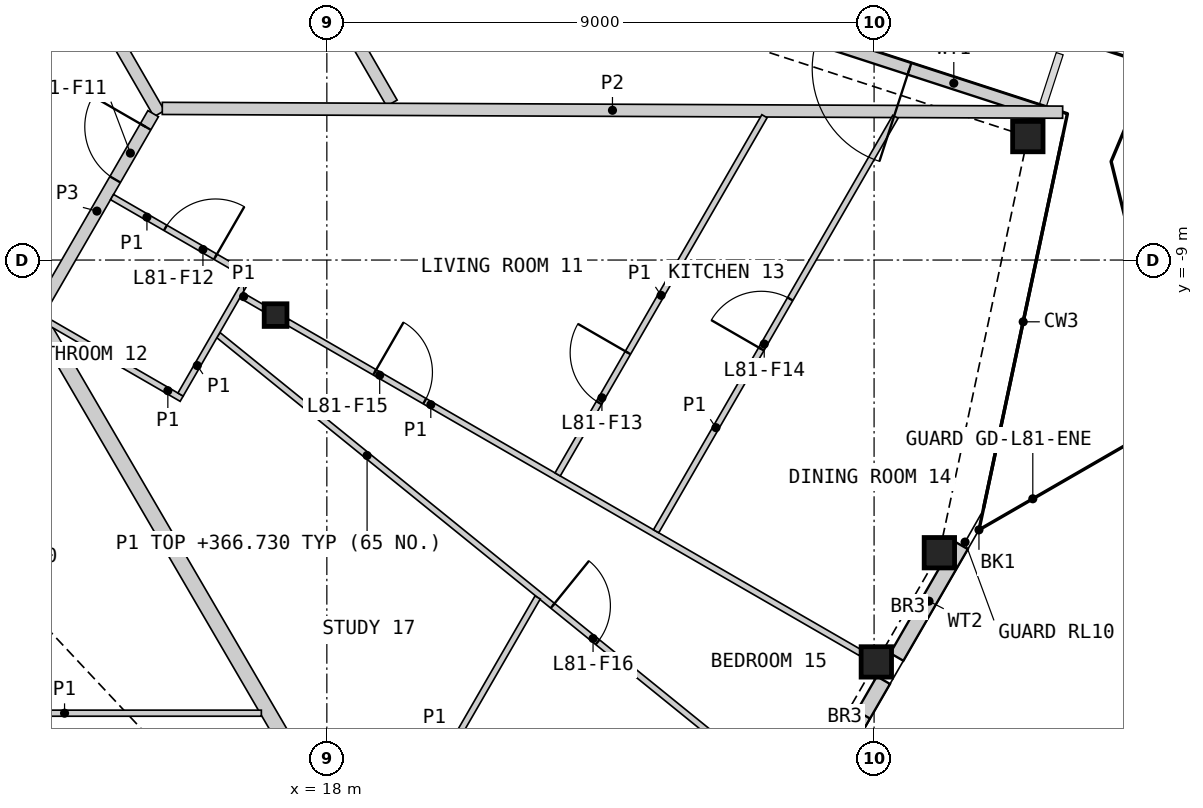
"""IFC4 building model, lengths in metres.
Left out: names, types, materials, properties, quantities, classifications, styles, units other than length and angle.
Written with IfcOpenShell. Run it as: python <this file> out.ifc"""

import sys

from ifc_helpers import new_model, si_unit, direction, frame, frame_2d, origin, origin_2d, place, context, subcontext, project, spatial, rectangle, hollow_rectangle, i_section, extrude, element, fill, save


model = new_model("IFC4")
c1 = context("Model", 3, precision=1e-05, world=origin(), true_north=direction((0.0, 1.0)))
c2 = subcontext(c1, "Body", "Model", "MODEL_VIEW")
j1 = project(units=[si_unit("LENGTHUNIT", "METRE"), si_unit("PLANEANGLEUNIT", "RADIAN")], contexts=[c1])
p1 = place(None, origin())
s1 = spatial("IfcSite", under=j1, at=p1, CompositionType="ELEMENT")
p2 = place(p1, origin())
s2 = spatial("IfcBuilding", under=s1, at=p2, CompositionType="ELEMENT")
p3 = place(p2, frame((0.0, 0.0, 364.4)))
s3 = spatial("IfcBuildingStorey", under=s2, at=p3, CompositionType="ELEMENT", Elevation=364.4)
for number, where, z_axis, x_axis in (
    (1, (27.037, -15.61, 0.0), (0.0, 0.0, 1.0), (1.0, 0.0, 0.0)),
    (2, (28.074, -13.814, 0.0), (0.0, 0.0, 1.0), (1.0, 0.0, 0.0)),
    (3, (29.529, -6.969, 0.0), (0.0, 0.0, 1.0), (1.0, 0.0, 0.0)),
):
    element("IfcColumn", number, at=place(p3, frame(where, z_axis=z_axis, x_axis=x_axis)), inside=s3, PredefinedType="COLUMN", context=c2, shape_type="SweptSolid", body=[
        extrude(hollow_rectangle(XDim=0.5, YDim=0.5, WallThickness=0.03, at=origin_2d()), origin(), (0.0, 0.0, 1.0), 3.4),
    ])
p4 = place(p3, frame((17.157, -9.906, 0.0), z_axis=(0.0, 0.0, 1.0), x_axis=(1.0, 0.0, 0.0)))
e4 = element("IfcColumn", 4, at=p4, inside=s3, PredefinedType="COLUMN", context=c2, shape_type="SweptSolid", body=[
    extrude(i_section(OverallWidth=0.374, OverallDepth=0.372, WebThickness=0.016, FlangeThickness=0.026, at=origin_2d()), origin(), (0.0, 0.0, 1.0), 3.4),
])
p5 = place(p3, frame((25.935, -18.02, 0.0), z_axis=(0.0, 0.0, 1.0), x_axis=(0.500028873844, 0.866008732821, 0.0)))
e5 = element("IfcWall", 5, at=p5, inside=s3, PredefinedType="SOLIDWALL", context=c2, shape_type="SweptSolid", body=[
    extrude(rectangle(XDim=2.437, YDim=0.25, at=frame_2d((1.218, 0.0))), origin(), (0.0, 0.0, 1.0), 2.634),
])
p6 = place(p5, frame((0.88, 0.0, 0.6)))
e6 = element("IfcOpeningElement", 6, at=p6, cuts=e5, PredefinedType="OPENING", context=c2, shape_type="SweptSolid", body=[
    extrude(rectangle(XDim=0.9, YDim=1.8, at=frame_2d((0.45, 0.9))), frame((0.0, 0.135, 0.0), z_axis=(0.0, -1.0, 0.0), x_axis=(1.0, 0.0, 0.0)), (0.0, 0.0, 1.0), 0.27),
])
p7 = place(p3, frame((27.374, -15.528, 0.0), z_axis=(0.0, 0.0, 1.0), x_axis=(0.499941779639, 0.866059014716, 0.0)))
e7 = element("IfcWall", 7, at=p7, inside=s3, PredefinedType="SOLIDWALL", context=c2, shape_type="SweptSolid", body=[
    extrude(rectangle(XDim=2.12, YDim=0.25, at=frame_2d((1.06, 0.0))), origin(), (0.0, 0.0, 1.0), 2.634),
])
p8 = place(p3, frame((29.801, -6.576, 0.0), z_axis=(0.0, 0.0, 1.0), x_axis=(-0.951060123915, 0.309005891041, 0.0)))
e8 = element("IfcWall", 8, at=p8, inside=s3, PredefinedType="SOLIDWALL", context=c2, shape_type="SweptSolid", body=[
    extrude(rectangle(XDim=6.265, YDim=0.2, at=frame_2d((3.133, 0.0))), origin(), (0.0, 0.0, 1.0), 2.634),
])
p9 = place(p8, frame((2.333, 0.0, 0.0)))
e9 = element("IfcOpeningElement", 9, at=p9, cuts=e8, PredefinedType="OPENING", context=c2, shape_type="SweptSolid", body=[
    extrude(rectangle(XDim=1.6, YDim=2.25, at=frame_2d((0.8, 1.125))), frame((0.0, 0.11, 0.0), z_axis=(0.0, -1.0, 0.0), x_axis=(1.0, 0.0, 0.0)), (0.0, 0.0, 1.0), 0.22),
])
p10 = place(p3, frame((13.168, -9.798, 0.0), z_axis=(0.0, 0.0, 1.0), x_axis=(0.503632750219, -0.863917850786, 0.0)))
e10 = element("IfcWall", 10, at=p10, inside=s3, PredefinedType="PARTITIONING", context=c2, shape_type="SweptSolid", body=[
    extrude(rectangle(XDim=14.972, YDim=0.25, at=frame_2d((7.486, 0.0))), origin(), (0.0, 0.0, 1.0), 2.33),
])
p11 = place(p3, frame((12.981, -2.673, 0.0), z_axis=(0.0, 0.0, 1.0), x_axis=(0.499974648164, -0.866040040179, 0.0)))
e11 = element("IfcWall", 11, at=p11, inside=s3, PredefinedType="PARTITIONING", context=c2, shape_type="SweptSolid", body=[
    extrude(rectangle(XDim=4.525, YDim=0.2, at=frame_2d((2.263, 0.0))), origin(), (0.0, 0.0, 1.0), 3.1),
])
p12 = place(p3, frame((13.293, -9.797, 0.0), z_axis=(0.0, 0.0, 1.0), x_axis=(0.499977520935, 0.86603838169, 0.0)))
e12 = element("IfcWall", 12, at=p12, inside=s3, PredefinedType="PARTITIONING", context=c2, shape_type="SweptSolid", body=[
    extrude(rectangle(XDim=3.701, YDim=0.2, at=frame_2d((1.851, 0.0))), origin(), (0.0, 0.0, 1.0), 3.1),
])
p13 = place(p12, frame((2.451, 0.0, 0.0)))
e13 = element("IfcOpeningElement", 13, at=p13, cuts=e12, PredefinedType="OPENING", context=c2, shape_type="SweptSolid", body=[
    extrude(rectangle(XDim=1.0, YDim=2.1, at=frame_2d((0.5, 1.05))), frame((0.0, 0.11, 0.0), z_axis=(0.0, -1.0, 0.0), x_axis=(1.0, 0.0, 0.0)), (0.0, 0.0, 1.0), 0.22),
])
p14 = place(p3, frame((11.573, 6.566, 0.0), z_axis=(0.0, 0.0, 1.0), x_axis=(0.499993542657, -0.866029131901, 0.0)))
e14 = element("IfcWall", 14, at=p14, inside=s3, PredefinedType="PARTITIONING", context=c2, shape_type="SweptSolid", body=[
    extrude(rectangle(XDim=14.994, YDim=0.2, at=frame_2d((7.497, 0.0))), origin(), (0.0, 0.0, 1.0), 2.33),
])
p15 = place(p14, frame((5.166, 0.0, 0.0)))
e15 = element("IfcOpeningElement", 15, at=p15, cuts=e14, PredefinedType="OPENING", context=c2, shape_type="SweptSolid", body=[
    extrude(rectangle(XDim=0.95, YDim=2.1, at=frame_2d((0.475, 1.05))), frame((0.0, 0.11, 0.0), z_axis=(0.0, -1.0, 0.0), x_axis=(1.0, 0.0, 0.0)), (0.0, 0.0, 1.0), 0.22),
])
p16 = place(p3, frame((15.294, -6.506, 0.0), z_axis=(0.0, 0.0, 1.0), x_axis=(0.99999116141, -0.004204414611, 0.0)))
e16 = element("IfcWall", 16, at=p16, inside=s3, PredefinedType="PARTITIONING", context=c2, shape_type="SweptSolid", body=[
    extrude(rectangle(XDim=14.807, YDim=0.2, at=frame_2d((7.404, 0.0))), origin(), (0.0, 0.0, 1.0), 2.33),
])
p17 = place(p3, frame((16.216, -10.234, 0.0), z_axis=(0.0, 0.0, 1.0), x_axis=(0.777145059662, -0.629321504672, 0.0)))
e17 = element("IfcWall", 17, at=p17, inside=s3, PredefinedType="PARTITIONING", context=c2, shape_type="SweptSolid", body=[
    extrude(rectangle(XDim=12.59, YDim=0.1, at=frame_2d((6.295, 0.0))), origin(), (0.0, 0.0, 1.0), 2.33),
])
p18 = place(p17, frame((7.074, 0.0, 0.0)))
e18 = element("IfcOpeningElement", 18, at=p18, cuts=e17, PredefinedType="OPENING", context=c2, shape_type="SweptSolid", body=[
    extrude(rectangle(XDim=0.95, YDim=2.1, at=frame_2d((0.475, 1.05))), frame((0.0, 0.06, 0.0), z_axis=(0.0, -1.0, 0.0), x_axis=(1.0, 0.0, 0.0)), (0.0, 0.0, 1.0), 0.12),
])
p19 = place(p3, frame((17.354, -10.019, 0.0), z_axis=(0.0, 0.0, 1.0), x_axis=(0.866019680922, -0.500009912158, 0.0)))
e19 = element("IfcWall", 19, at=p19, inside=s3, PredefinedType="PARTITIONING", context=c2, shape_type="SweptSolid", body=[
    extrude(rectangle(XDim=10.881, YDim=0.1, at=frame_2d((5.44, 0.0))), origin(), (0.0, 0.0, 1.0), 2.33),
])
p20 = place(p19, frame((1.655, 0.0, 0.0)))
e20 = element("IfcOpeningElement", 20, at=p20, cuts=e19, PredefinedType="OPENING", context=c2, shape_type="SweptSolid", body=[
    extrude(rectangle(XDim=0.95, YDim=2.1, at=frame_2d((0.475, 1.05))), frame((0.0, 0.06, 0.0), z_axis=(0.0, -1.0, 0.0), x_axis=(1.0, 0.0, 0.0)), (0.0, 0.0, 1.0), 0.12),
])
p21 = place(p3, frame((23.415, -13.461, 0.0), z_axis=(0.0, 0.0, 1.0), x_axis=(0.500011483804, 0.866018773506, 0.0)))
e21 = element("IfcWall", 21, at=p21, inside=s3, PredefinedType="PARTITIONING", context=c2, shape_type="SweptSolid", body=[
    extrude(rectangle(XDim=7.872, YDim=0.1, at=frame_2d((3.936, 0.0))), origin(), (0.0, 0.0, 1.0), 2.33),
])
p22 = place(p21, frame((3.461, 0.0, 0.0)))
e22 = element("IfcOpeningElement", 22, at=p22, cuts=e21, PredefinedType="OPENING", context=c2, shape_type="SweptSolid", body=[
    extrude(rectangle(XDim=0.95, YDim=2.1, at=frame_2d((0.475, 1.05))), frame((0.0, 0.06, 0.0), z_axis=(0.0, -1.0, 0.0), x_axis=(1.0, 0.0, 0.0)), (0.0, 0.0, 1.0), 0.12),
])
p23 = place(p3, frame((21.796, -12.526, 0.0), z_axis=(0.0, 0.0, 1.0), x_axis=(0.499994777381, 0.866028419044, 0.0)))
e23 = element("IfcWall", 23, at=p23, inside=s3, PredefinedType="PARTITIONING", context=c2, shape_type="SweptSolid", body=[
    extrude(rectangle(XDim=6.803, YDim=0.1, at=frame_2d((3.402, 0.0))), origin(), (0.0, 0.0, 1.0), 2.33),
])
p24 = place(p23, frame((1.361, 0.0, 0.0)))
e24 = element("IfcOpeningElement", 24, at=p24, cuts=e23, PredefinedType="OPENING", context=c2, shape_type="SweptSolid", body=[
    extrude(rectangle(XDim=0.95, YDim=2.1, at=frame_2d((0.475, 1.05))), frame((0.0, 0.06, 0.0), z_axis=(0.0, -1.0, 0.0), x_axis=(1.0, 0.0, 0.0)), (0.0, 0.0, 1.0), 0.12),
])
p25 = place(p3, frame((10.45, -16.453, 0.0), z_axis=(0.0, 0.0, 1.0), x_axis=(1.0, 0.0, 0.0)))
e25 = element("IfcWall", 25, at=p25, inside=s3, PredefinedType="PARTITIONING", context=c2, shape_type="SweptSolid", body=[
    extrude(rectangle(XDim=6.473, YDim=0.1, at=frame_2d((3.236, 0.0))), origin(), (0.0, 0.0, 1.0), 2.33),
])
p26 = place(p25, frame((0.853, 0.0, 0.0)))
e26 = element("IfcOpeningElement", 26, at=p26, cuts=e25, PredefinedType="OPENING", context=c2, shape_type="SweptSolid", body=[
    extrude(rectangle(XDim=0.95, YDim=2.1, at=frame_2d((0.475, 1.05))), frame((0.0, 0.06, 0.0), z_axis=(0.0, -1.0, 0.0), x_axis=(1.0, 0.0, 0.0)), (0.0, 0.0, 1.0), 0.12),
])
p27 = place(p3, frame((18.778, -19.206, 0.0), z_axis=(0.0, 0.0, 1.0), x_axis=(0.499992359988, 0.866029814703, 0.0)))
e27 = element("IfcWall", 27, at=p27, inside=s3, PredefinedType="PARTITIONING", context=c2, shape_type="SweptSolid", body=[
    extrude(rectangle(XDim=5.376, YDim=0.1, at=frame_2d((2.688, 0.0))), origin(), (0.0, 0.0, 1.0), 2.33),
])
p28 = place(p27, frame((1.659, 0.0, 0.0)))
e28 = element("IfcOpeningElement", 28, at=p28, cuts=e27, PredefinedType="OPENING", context=c2, shape_type="SweptSolid", body=[
    extrude(rectangle(XDim=0.95, YDim=2.1, at=frame_2d((0.475, 1.05))), frame((0.0, 0.06, 0.0), z_axis=(0.0, -1.0, 0.0), x_axis=(1.0, 0.0, 0.0)), (0.0, 0.0, 1.0), 0.12),
])
p29 = place(p3, frame((14.467, -7.964, 0.0), z_axis=(0.0, 0.0, 1.0), x_axis=(0.86601223543, -0.500022807565, 0.0)))
e29 = element("IfcWall", 29, at=p29, inside=s3, PredefinedType="PARTITIONING", context=c2, shape_type="SweptSolid", body=[
    extrude(rectangle(XDim=2.65, YDim=0.1, at=frame_2d((1.325, 0.0))), origin(), (0.0, 0.0, 1.0), 2.33),
])
p30 = place(p29, frame((1.014, 0.0, 0.0)))
e30 = element("IfcOpeningElement", 30, at=p30, cuts=e29, PredefinedType="OPENING", context=c2, shape_type="SweptSolid", body=[
    extrude(rectangle(XDim=0.95, YDim=2.1, at=frame_2d((0.475, 1.05))), frame((0.0, 0.06, 0.0), z_axis=(0.0, -1.0, 0.0), x_axis=(1.0, 0.0, 0.0)), (0.0, 0.0, 1.0), 0.12),
])
p31 = place(p3, frame((13.339, -9.968, 0.0), z_axis=(0.0, 0.0, 1.0), x_axis=(0.866013657776, -0.500020344131, 0.0)))
e31 = element("IfcWall", 31, at=p31, inside=s3, PredefinedType="PARTITIONING", context=c2, shape_type="SweptSolid", body=[
    extrude(rectangle(XDim=2.625, YDim=0.1, at=frame_2d((1.312, 0.0))), origin(), (0.0, 0.0, 1.0), 2.33),
])
p32 = place(p3, frame((15.594, -11.212, 0.0), z_axis=(0.0, 0.0, 1.0), x_axis=(0.499981787252, 0.866035918664, 0.0)))
e32 = element("IfcWall", 32, at=p32, inside=s3, PredefinedType="PARTITIONING", context=c2, shape_type="SweptSolid", body=[
    extrude(rectangle(XDim=2.2, YDim=0.1, at=frame_2d((1.1, 0.0))), origin(), (0.0, 0.0, 1.0), 2.33),
])
p33 = place(p3, frame((16.594, -9.581, 0.0), z_axis=(0.0, 0.0, 1.0), x_axis=(0.866137484628, -0.499805820016, 0.0)))
e33 = element("IfcWall", 33, at=p33, inside=s3, PredefinedType="PARTITIONING", context=c2, shape_type="SweptSolid", body=[
    extrude(rectangle(XDim=0.423, YDim=0.1, at=frame_2d((0.211, 0.0))), origin(), (0.0, 0.0, 1.0), 2.33),
])
p34 = place(p6, origin())
e34 = element("IfcWindow", 34, at=p34, inside=s3, PartitioningType="SINGLE_PANEL", PredefinedType="WINDOW", context=c2, shape_type="SweptSolid", body=[
    extrude(rectangle(XDim=0.9, YDim=1.8, at=frame_2d((0.45, 0.9))), frame((0.0, 0.03, 0.0), z_axis=(0.0, -1.0, 0.0), x_axis=(1.0, 0.0, 0.0)), (0.0, 0.0, 1.0), 0.06),
])
fill(e6, e34)
p35 = place(p9, origin())
e35 = element("IfcDoor", 35, at=p35, inside=s3, OperationType="DOUBLE_DOOR_SINGLE_SWING", PredefinedType="DOOR", context=c2, shape_type="SweptSolid", body=[
    extrude(rectangle(XDim=1.6, YDim=2.25, at=frame_2d((0.8, 1.125))), frame((0.0, 0.025, 0.0), z_axis=(0.0, -1.0, 0.0), x_axis=(1.0, 0.0, 0.0)), (0.0, 0.0, 1.0), 0.05),
])
fill(e9, e35)
p36 = place(p13, origin())
e36 = element("IfcDoor", 36, at=p36, inside=s3, OperationType="SINGLE_SWING_RIGHT", PredefinedType="DOOR", context=c2, shape_type="SweptSolid", body=[
    extrude(rectangle(XDim=1.0, YDim=2.1, at=frame_2d((0.5, 1.05))), frame((0.0, 0.025, 0.0), z_axis=(0.0, -1.0, 0.0), x_axis=(1.0, 0.0, 0.0)), (0.0, 0.0, 1.0), 0.05),
])
fill(e13, e36)
p37 = place(p30, origin())
e37 = element("IfcDoor", 37, at=p37, inside=s3, OperationType="SINGLE_SWING_RIGHT", PredefinedType="DOOR", context=c2, shape_type="SweptSolid", body=[
    extrude(rectangle(XDim=0.95, YDim=2.1, at=frame_2d((0.475, 1.05))), frame((0.0, 0.025, 0.0), z_axis=(0.0, -1.0, 0.0), x_axis=(1.0, 0.0, 0.0)), (0.0, 0.0, 1.0), 0.05),
])
fill(e30, e37)
p38 = place(p24, origin())
e38 = element("IfcDoor", 38, at=p38, inside=s3, OperationType="SINGLE_SWING_RIGHT", PredefinedType="DOOR", context=c2, shape_type="SweptSolid", body=[
    extrude(rectangle(XDim=0.95, YDim=2.1, at=frame_2d((0.475, 1.05))), frame((0.0, 0.025, 0.0), z_axis=(0.0, -1.0, 0.0), x_axis=(1.0, 0.0, 0.0)), (0.0, 0.0, 1.0), 0.05),
])
fill(e24, e38)
p39 = place(p22, origin())
e39 = element("IfcDoor", 39, at=p39, inside=s3, OperationType="SINGLE_SWING_LEFT", PredefinedType="DOOR", context=c2, shape_type="SweptSolid", body=[
    extrude(rectangle(XDim=0.95, YDim=2.1, at=frame_2d((0.475, 1.05))), frame((0.0, 0.025, 0.0), z_axis=(0.0, -1.0, 0.0), x_axis=(1.0, 0.0, 0.0)), (0.0, 0.0, 1.0), 0.05),
])
fill(e22, e39)
p40 = place(p20, origin())
e40 = element("IfcDoor", 40, at=p40, inside=s3, OperationType="SINGLE_SWING_LEFT", PredefinedType="DOOR", context=c2, shape_type="SweptSolid", body=[
    extrude(rectangle(XDim=0.95, YDim=2.1, at=frame_2d((0.475, 1.05))), frame((0.0, 0.025, 0.0), z_axis=(0.0, -1.0, 0.0), x_axis=(1.0, 0.0, 0.0)), (0.0, 0.0, 1.0), 0.05),
])
fill(e20, e40)
p41 = place(p18, origin())
e41 = element("IfcDoor", 41, at=p41, inside=s3, OperationType="SINGLE_SWING_LEFT", PredefinedType="DOOR", context=c2, shape_type="SweptSolid", body=[
    extrude(rectangle(XDim=0.95, YDim=2.1, at=frame_2d((0.475, 1.05))), frame((0.0, 0.025, 0.0), z_axis=(0.0, -1.0, 0.0), x_axis=(1.0, 0.0, 0.0)), (0.0, 0.0, 1.0), 0.05),
])
fill(e18, e41)
save(model, sys.argv[1])
